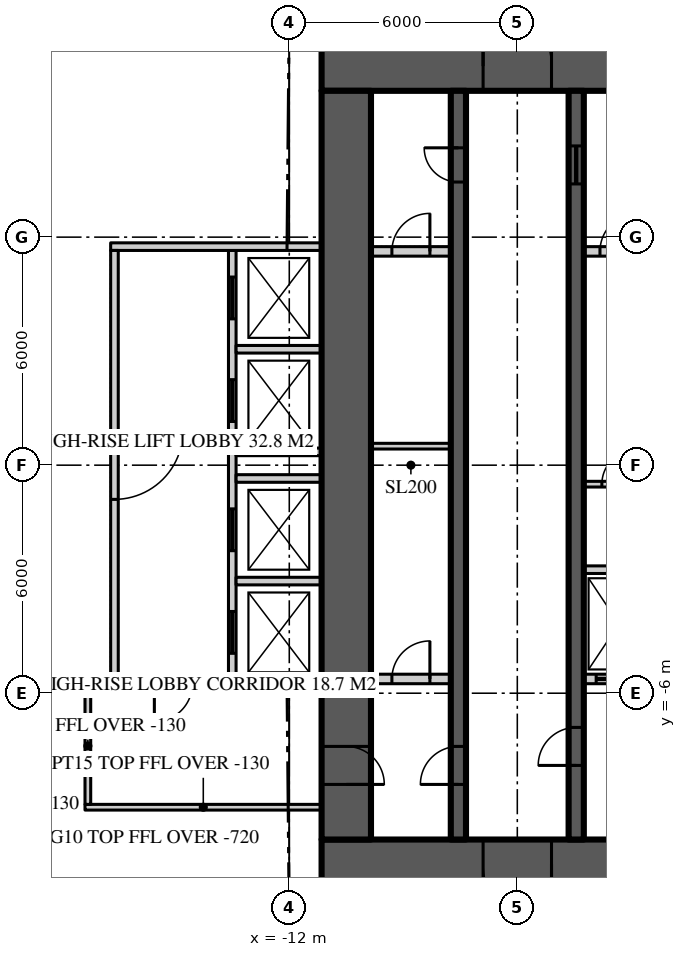
"""IFC4 building model, lengths in metres.
Left out: names, types, materials, properties, quantities, classifications, styles, units other than length and angle.
Written with IfcOpenShell. Run it as: python <this file> out.ifc"""

import sys

from ifc_helpers import new_model, si_unit, direction, frame, frame_2d, origin, place, context, subcontext, project, spatial, rectangle, extrude, element, fill, save


model = new_model("IFC4")
c1 = context("Model", 3, precision=1e-05, world=origin(), true_north=direction((0.0, 1.0)))
c2 = subcontext(c1, "Body", "Model", "MODEL_VIEW")
j1 = project(units=[si_unit("LENGTHUNIT", "METRE"), si_unit("PLANEANGLEUNIT", "RADIAN")], contexts=[c1])
p1 = place(None, origin())
s1 = spatial("IfcSite", under=j1, at=p1, CompositionType="ELEMENT")
p2 = place(p1, origin())
s2 = spatial("IfcBuilding", under=s1, at=p2, CompositionType="ELEMENT")
p3 = place(p2, frame((0.0, 0.0, 232.2)))
s3 = spatial("IfcBuildingStorey", under=s2, at=p3, CompositionType="ELEMENT", Elevation=232.2)
p4 = place(p3, frame((-11.15, 10.5, 0.0), z_axis=(0.0, 0.0, 1.0), x_axis=(1.0, 0.0, 0.0)))
e1 = element("IfcWall", 1, at=p4, inside=s3, PredefinedType="SHEAR", context=c2, shape_type="SweptSolid", body=[
    extrude(rectangle(XDim=22.3, YDim=1.3, at=frame_2d((11.15, 0.0))), origin(), (0.0, 0.0, 1.0), 3.9),
])
p5 = place(p4, frame((4.25, 0.0, 0.0)))
e2 = element("IfcOpeningElement", 2, at=p5, cuts=e1, PredefinedType="OPENING", context=c2, shape_type="SweptSolid", body=[
    extrude(rectangle(XDim=1.8, YDim=2.2, at=frame_2d((0.9, 1.1))), frame((0.0, 0.66, 0.0), z_axis=(0.0, -1.0, 0.0), x_axis=(1.0, 0.0, 0.0)), (0.0, 0.0, 1.0), 1.32),
])
p6 = place(p4, frame((16.25, 0.0, 0.0)))
e3 = element("IfcOpeningElement", 3, at=p6, cuts=e1, PredefinedType="OPENING", context=c2, shape_type="SweptSolid", body=[
    extrude(rectangle(XDim=1.8, YDim=2.2, at=frame_2d((0.9, 1.1))), frame((0.0, 0.66, 0.0), z_axis=(0.0, -1.0, 0.0), x_axis=(1.0, 0.0, 0.0)), (0.0, 0.0, 1.0), 1.32),
])
p7 = place(p3, frame((11.15, -10.5, 0.0), z_axis=(0.0, 0.0, 1.0), x_axis=(-1.0, 0.0, 0.0)))
e4 = element("IfcWall", 4, at=p7, inside=s3, PredefinedType="SHEAR", context=c2, shape_type="SweptSolid", body=[
    extrude(rectangle(XDim=22.3, YDim=1.3, at=frame_2d((11.15, 0.0))), origin(), (0.0, 0.0, 1.0), 3.9),
])
p8 = place(p7, frame((16.25, 0.0, 0.0)))
e5 = element("IfcOpeningElement", 5, at=p8, cuts=e4, PredefinedType="OPENING", context=c2, shape_type="SweptSolid", body=[
    extrude(rectangle(XDim=1.8, YDim=2.2, at=frame_2d((0.9, 1.1))), frame((0.0, 0.66, 0.0), z_axis=(0.0, -1.0, 0.0), x_axis=(1.0, 0.0, 0.0)), (0.0, 0.0, 1.0), 1.32),
])
p9 = place(p7, frame((4.25, 0.0, 0.0)))
e6 = element("IfcOpeningElement", 6, at=p9, cuts=e4, PredefinedType="OPENING", context=c2, shape_type="SweptSolid", body=[
    extrude(rectangle(XDim=1.8, YDim=2.2, at=frame_2d((0.9, 1.1))), frame((0.0, 0.66, 0.0), z_axis=(0.0, -1.0, 0.0), x_axis=(1.0, 0.0, 0.0)), (0.0, 0.0, 1.0), 1.32),
])
p10 = place(p3, frame((-10.5, 9.85, 0.0), z_axis=(0.0, 0.0, 1.0), x_axis=(0.0, -1.0, 0.0)))
e7 = element("IfcWall", 7, at=p10, inside=s3, PredefinedType="SHEAR", context=c2, shape_type="SweptSolid", body=[
    extrude(rectangle(XDim=19.7, YDim=1.3, at=frame_2d((9.85, 0.0))), origin(), (0.0, 0.0, 1.0), 3.9),
])
p11 = place(p10, frame((17.25, 0.0, 0.0)))
e8 = element("IfcOpeningElement", 8, at=p11, cuts=e7, PredefinedType="OPENING", context=c2, shape_type="SweptSolid", body=[
    extrude(rectangle(XDim=1.0, YDim=2.2, at=frame_2d((0.5, 1.1))), frame((0.0, 0.66, 0.0), z_axis=(0.0, -1.0, 0.0), x_axis=(1.0, 0.0, 0.0)), (0.0, 0.0, 1.0), 1.32),
])
p12 = place(p3, frame((-7.55, -9.85, 0.0), z_axis=(0.0, 0.0, 1.0), x_axis=(0.0, 1.0, 0.0)))
e9 = element("IfcWall", 9, at=p12, inside=s3, PredefinedType="SHEAR", context=c2, shape_type="SweptSolid", body=[
    extrude(rectangle(XDim=19.7, YDim=0.4, at=frame_2d((9.85, 0.0))), origin(), (0.0, 0.0, 1.0), 3.9),
])
p13 = place(p12, frame((1.45, 0.0, 0.0)))
e10 = element("IfcOpeningElement", 10, at=p13, cuts=e9, PredefinedType="OPENING", context=c2, shape_type="SweptSolid", body=[
    extrude(rectangle(XDim=1.0, YDim=2.2, at=frame_2d((0.5, 1.1))), frame((0.0, 0.21, 0.0), z_axis=(0.0, -1.0, 0.0), x_axis=(1.0, 0.0, 0.0)), (0.0, 0.0, 1.0), 0.42),
])
p14 = place(p12, frame((17.3, 0.0, 0.0)))
e11 = element("IfcOpeningElement", 11, at=p14, cuts=e9, PredefinedType="OPENING", context=c2, shape_type="SweptSolid", body=[
    extrude(rectangle(XDim=0.9, YDim=2.1, at=frame_2d((0.45, 1.05))), frame((0.0, 0.21, 0.0), z_axis=(0.0, -1.0, 0.0), x_axis=(1.0, 0.0, 0.0)), (0.0, 0.0, 1.0), 0.42),
])
p15 = place(p3, frame((-4.45, -9.85, 0.0), z_axis=(0.0, 0.0, 1.0), x_axis=(0.0, 1.0, 0.0)))
e12 = element("IfcWall", 12, at=p15, inside=s3, PredefinedType="SHEAR", context=c2, shape_type="SweptSolid", body=[
    extrude(rectangle(XDim=19.7, YDim=0.4, at=frame_2d((9.85, 0.0))), origin(), (0.0, 0.0, 1.0), 3.9),
])
p16 = place(p15, frame((1.95, 0.0, 0.0)))
e13 = element("IfcOpeningElement", 13, at=p16, cuts=e12, PredefinedType="OPENING", context=c2, shape_type="SweptSolid", body=[
    extrude(rectangle(XDim=1.0, YDim=2.2, at=frame_2d((0.5, 1.1))), frame((0.0, 0.21, 0.0), z_axis=(0.0, -1.0, 0.0), x_axis=(1.0, 0.0, 0.0)), (0.0, 0.0, 1.0), 0.42),
])
p17 = place(p15, frame((17.25, 0.0, 0.0)))
e14 = element("IfcOpeningElement", 14, at=p17, cuts=e12, PredefinedType="OPENING", context=c2, shape_type="SweptSolid", body=[
    extrude(rectangle(XDim=1.0, YDim=2.1, at=frame_2d((0.5, 1.05))), frame((0.0, 0.21, 0.0), z_axis=(0.0, -1.0, 0.0), x_axis=(1.0, 0.0, 0.0)), (0.0, 0.0, 1.0), 0.42),
])
p18 = place(p3, frame((-9.85, 5.625, 0.0), z_axis=(0.0, 0.0, 1.0), x_axis=(1.0, 0.0, 0.0)))
e15 = element("IfcWall", 15, at=p18, inside=s3, PredefinedType="SOLIDWALL", context=c2, shape_type="SweptSolid", body=[
    extrude(rectangle(XDim=2.1, YDim=0.25, at=frame_2d((1.05, 0.0))), origin(), (0.0, 0.0, 1.0), 3.7),
])
p19 = place(p18, frame((0.55, 0.0, 0.0)))
e16 = element("IfcOpeningElement", 16, at=p19, cuts=e15, PredefinedType="OPENING", context=c2, shape_type="SweptSolid", body=[
    extrude(rectangle(XDim=1.0, YDim=2.2, at=frame_2d((0.5, 1.1))), frame((0.0, 0.135, 0.0), z_axis=(0.0, -1.0, 0.0), x_axis=(1.0, 0.0, 0.0)), (0.0, 0.0, 1.0), 0.27),
])
p20 = place(p3, frame((-4.25, 5.625, 0.0), z_axis=(0.0, 0.0, 1.0), x_axis=(1.0, 0.0, 0.0)))
e17 = element("IfcWall", 17, at=p20, inside=s3, PredefinedType="SOLIDWALL", context=c2, shape_type="SweptSolid", body=[
    extrude(rectangle(XDim=1.85, YDim=0.25, at=frame_2d((0.925, 0.0))), origin(), (0.0, 0.0, 1.0), 3.7),
])
p21 = place(p20, frame((0.425, 0.0, 0.0)))
e18 = element("IfcOpeningElement", 18, at=p21, cuts=e17, PredefinedType="OPENING", context=c2, shape_type="SweptSolid", body=[
    extrude(rectangle(XDim=1.0, YDim=2.2, at=frame_2d((0.5, 1.1))), frame((0.0, 0.135, 0.0), z_axis=(0.0, -1.0, 0.0), x_axis=(1.0, 0.0, 0.0)), (0.0, 0.0, 1.0), 0.27),
])
p22 = place(p3, frame((-9.85, -5.625, 0.0), z_axis=(0.0, 0.0, 1.0), x_axis=(1.0, 0.0, 0.0)))
e19 = element("IfcWall", 19, at=p22, inside=s3, PredefinedType="SOLIDWALL", context=c2, shape_type="SweptSolid", body=[
    extrude(rectangle(XDim=2.1, YDim=0.25, at=frame_2d((1.05, 0.0))), origin(), (0.0, 0.0, 1.0), 3.7),
])
p23 = place(p22, frame((0.55, 0.0, 0.0)))
e20 = element("IfcOpeningElement", 20, at=p23, cuts=e19, PredefinedType="OPENING", context=c2, shape_type="SweptSolid", body=[
    extrude(rectangle(XDim=1.0, YDim=2.2, at=frame_2d((0.5, 1.1))), frame((0.0, 0.135, 0.0), z_axis=(0.0, -1.0, 0.0), x_axis=(1.0, 0.0, 0.0)), (0.0, 0.0, 1.0), 0.27),
])
p24 = place(p3, frame((-4.25, -5.625, 0.0), z_axis=(0.0, 0.0, 1.0), x_axis=(1.0, 0.0, 0.0)))
e21 = element("IfcWall", 21, at=p24, inside=s3, PredefinedType="SOLIDWALL", context=c2, shape_type="SweptSolid", body=[
    extrude(rectangle(XDim=1.85, YDim=0.25, at=frame_2d((0.925, 0.0))), origin(), (0.0, 0.0, 1.0), 3.7),
])
p25 = place(p24, frame((0.325, 0.0, 0.0)))
e22 = element("IfcOpeningElement", 22, at=p25, cuts=e21, PredefinedType="OPENING", context=c2, shape_type="SweptSolid", body=[
    extrude(rectangle(XDim=1.2, YDim=2.2, at=frame_2d((0.6, 1.1))), frame((0.0, 0.135, 0.0), z_axis=(0.0, -1.0, 0.0), x_axis=(1.0, 0.0, 0.0)), (0.0, 0.0, 1.0), 0.27),
])
p26 = place(p3, frame((-4.25, -2.75, 0.0), z_axis=(0.0, 0.0, 1.0), x_axis=(1.0, 0.0, 0.0)))
e23 = element("IfcWall", 23, at=p26, inside=s3, PredefinedType="SOLIDWALL", context=c2, shape_type="SweptSolid", body=[
    extrude(rectangle(XDim=1.85, YDim=0.2, at=frame_2d((0.925, 0.0))), origin(), (0.0, 0.0, 1.0), 3.7),
])
p27 = place(p3, frame((-13.5, 5.65, 0.0), z_axis=(0.0, 0.0, 1.0), x_axis=(0.0, -1.0, 0.0)))
e24 = element("IfcWall", 24, at=p27, inside=s3, PredefinedType="SOLIDWALL", context=c2, shape_type="SweptSolid", body=[
    extrude(rectangle(XDim=11.3, YDim=0.2, at=frame_2d((5.65, 0.0))), origin(), (0.0, 0.0, 1.0), 3.7),
])
p28 = place(p27, frame((0.7, 0.0, 0.0)))
e25 = element("IfcOpeningElement", 25, at=p28, cuts=e24, PredefinedType="OPENING", context=c2, shape_type="SweptSolid", body=[
    extrude(rectangle(XDim=1.1, YDim=2.2, at=frame_2d((0.55, 1.1))), frame((0.0, 0.11, 0.0), z_axis=(0.0, -1.0, 0.0), x_axis=(1.0, 0.0, 0.0)), (0.0, 0.0, 1.0), 0.22),
])
p29 = place(p27, frame((3.4, 0.0, 0.0)))
e26 = element("IfcOpeningElement", 26, at=p29, cuts=e24, PredefinedType="OPENING", context=c2, shape_type="SweptSolid", body=[
    extrude(rectangle(XDim=1.1, YDim=2.2, at=frame_2d((0.55, 1.1))), frame((0.0, 0.11, 0.0), z_axis=(0.0, -1.0, 0.0), x_axis=(1.0, 0.0, 0.0)), (0.0, 0.0, 1.0), 0.22),
])
p30 = place(p27, frame((6.8, 0.0, 0.0)))
e27 = element("IfcOpeningElement", 27, at=p30, cuts=e24, PredefinedType="OPENING", context=c2, shape_type="SweptSolid", body=[
    extrude(rectangle(XDim=1.1, YDim=2.2, at=frame_2d((0.55, 1.1))), frame((0.0, 0.11, 0.0), z_axis=(0.0, -1.0, 0.0), x_axis=(1.0, 0.0, 0.0)), (0.0, 0.0, 1.0), 0.22),
])
p31 = place(p27, frame((9.5, 0.0, 0.0)))
e28 = element("IfcOpeningElement", 28, at=p31, cuts=e24, PredefinedType="OPENING", context=c2, shape_type="SweptSolid", body=[
    extrude(rectangle(XDim=1.1, YDim=2.2, at=frame_2d((0.55, 1.1))), frame((0.0, 0.11, 0.0), z_axis=(0.0, -1.0, 0.0), x_axis=(1.0, 0.0, 0.0)), (0.0, 0.0, 1.0), 0.22),
])
p32 = place(p3, frame((-11.15, 5.75, 0.0), z_axis=(0.0, 0.0, 1.0), x_axis=(-1.0, 0.0, 0.0)))
e29 = element("IfcWall", 29, at=p32, inside=s3, PredefinedType="SOLIDWALL", context=c2, shape_type="SweptSolid", body=[
    extrude(rectangle(XDim=5.55, YDim=0.2, at=frame_2d((2.775, 0.0))), origin(), (0.0, 0.0, 1.0), 3.7),
])
p33 = place(p3, frame((-11.15, -5.75, 0.0), z_axis=(0.0, 0.0, 1.0), x_axis=(-1.0, 0.0, 0.0)))
e30 = element("IfcWall", 30, at=p33, inside=s3, PredefinedType="SOLIDWALL", context=c2, shape_type="SweptSolid", body=[
    extrude(rectangle(XDim=5.55, YDim=0.2, at=frame_2d((2.775, 0.0))), origin(), (0.0, 0.0, 1.0), 3.7),
])
p34 = place(p33, frame((3.4, 0.0, 0.0)))
e31 = element("IfcOpeningElement", 31, at=p34, cuts=e30, PredefinedType="OPENING", context=c2, shape_type="SweptSolid", body=[
    extrude(rectangle(XDim=1.0, YDim=2.2, at=frame_2d((0.5, 1.1))), frame((0.0, 0.11, 0.0), z_axis=(0.0, -1.0, 0.0), x_axis=(1.0, 0.0, 0.0)), (0.0, 0.0, 1.0), 0.22),
])
for number, where, z_axis, x_axis in (
    (32, (-11.15, 3.05, 0.0), (0.0, 0.0, 1.0), (-1.0, 0.0, 0.0)),
    (33, (-11.15, 0.35, 0.0), (0.0, 0.0, 1.0), (-1.0, 0.0, 0.0)),
    (34, (-11.15, -0.35, 0.0), (0.0, 0.0, 1.0), (-1.0, 0.0, 0.0)),
    (35, (-11.15, -3.05, 0.0), (0.0, 0.0, 1.0), (-1.0, 0.0, 0.0)),
):
    element("IfcWall", number, at=place(p3, frame(where, z_axis=z_axis, x_axis=x_axis)), inside=s3, PredefinedType="SOLIDWALL", context=c2, shape_type="SweptSolid", body=[
        extrude(rectangle(XDim=2.25, YDim=0.2, at=frame_2d((1.125, 0.0))), origin(), (0.0, 0.0, 1.0), 3.7),
    ])
p35 = place(p3, frame((-16.6, 5.65, 0.0), z_axis=(0.0, 0.0, 1.0), x_axis=(0.0, -1.0, 0.0)))
e36 = element("IfcWall", 36, at=p35, inside=s3, PredefinedType="SOLIDWALL", context=c2, shape_type="SweptSolid", body=[
    extrude(rectangle(XDim=11.3, YDim=0.2, at=frame_2d((5.65, 0.0))), origin(), (0.0, 0.0, 1.0), 3.18),
])
p36 = place(p35, frame((4.75, 0.0, 0.0)))
e37 = element("IfcOpeningElement", 37, at=p36, cuts=e36, PredefinedType="OPENING", context=c2, shape_type="SweptSolid", body=[
    extrude(rectangle(XDim=1.8, YDim=2.2, at=frame_2d((0.9, 1.1))), frame((0.0, 0.11, 0.0), z_axis=(0.0, -1.0, 0.0), x_axis=(1.0, 0.0, 0.0)), (0.0, 0.0, 1.0), 0.22),
])
p37 = place(p3, frame((-11.15, -9.0, 0.0), z_axis=(0.0, 0.0, 1.0), x_axis=(-1.0, 0.0, 0.0)))
e38 = element("IfcWall", 38, at=p37, inside=s3, PredefinedType="PARTITIONING", context=c2, shape_type="SweptSolid", body=[
    extrude(rectangle(XDim=6.225, YDim=0.15, at=frame_2d((3.113, 0.0))), origin(), (0.0, 0.0, 1.0), 3.77),
])
p38 = place(p3, frame((-17.3, -5.85, 0.0), z_axis=(0.0, 0.0, 1.0), x_axis=(0.0, -1.0, 0.0)))
e39 = element("IfcWall", 39, at=p38, inside=s3, PredefinedType="PARTITIONING", context=c2, shape_type="SweptSolid", body=[
    extrude(rectangle(XDim=3.075, YDim=0.15, at=frame_2d((1.538, 0.0))), origin(), (0.0, 0.0, 1.0), 3.77),
])
p39 = place(p3, frame((-9.85, 0.5, 0.0), z_axis=(0.0, 0.0, 1.0), x_axis=(1.0, 0.0, 0.0)))
e40 = element("IfcWall", 40, at=p39, inside=s3, PredefinedType="SOLIDWALL", context=c2, shape_type="SweptSolid", body=[
    extrude(rectangle(XDim=2.1, YDim=0.15, at=frame_2d((1.05, 0.0))), origin(), (0.0, 0.0, 1.0), 3.77),
])
p40 = place(p3, frame((-4.25, -0.5, 0.0), z_axis=(0.0, 0.0, 1.0), x_axis=(1.0, 0.0, 0.0)))
e41 = element("IfcWall", 41, at=p40, inside=s3, PredefinedType="SOLIDWALL", context=c2, shape_type="SweptSolid", body=[
    extrude(rectangle(XDim=1.85, YDim=0.15, at=frame_2d((0.925, 0.0))), origin(), (0.0, 0.0, 1.0), 3.77),
])
p41 = place(p40, frame((0.475, 0.0, 0.0)))
e42 = element("IfcOpeningElement", 42, at=p41, cuts=e41, PredefinedType="OPENING", context=c2, shape_type="SweptSolid", body=[
    extrude(rectangle(XDim=0.9, YDim=2.1, at=frame_2d((0.45, 1.05))), frame((0.0, 0.085, 0.0), z_axis=(0.0, -1.0, 0.0), x_axis=(1.0, 0.0, 0.0)), (0.0, 0.0, 1.0), 0.17),
])
p42 = place(p5, origin())
e43 = element("IfcDoor", 43, at=p42, inside=s3, OperationType="DOUBLE_DOOR_DOUBLE_SWING", PredefinedType="DOOR", context=c2, shape_type="SweptSolid", body=[
    extrude(rectangle(XDim=1.8, YDim=2.2, at=frame_2d((0.9, 1.1))), frame((0.0, 0.025, 0.0), z_axis=(0.0, -1.0, 0.0), x_axis=(1.0, 0.0, 0.0)), (0.0, 0.0, 1.0), 0.05),
])
fill(e2, e43)
p43 = place(p8, origin())
e44 = element("IfcDoor", 44, at=p43, inside=s3, OperationType="DOUBLE_DOOR_DOUBLE_SWING", PredefinedType="DOOR", context=c2, shape_type="SweptSolid", body=[
    extrude(rectangle(XDim=1.8, YDim=2.2, at=frame_2d((0.9, 1.1))), frame((0.0, 0.025, 0.0), z_axis=(0.0, -1.0, 0.0), x_axis=(1.0, 0.0, 0.0)), (0.0, 0.0, 1.0), 0.05),
])
fill(e5, e44)
p44 = place(p13, origin())
e45 = element("IfcDoor", 45, at=p44, inside=s3, OperationType="SINGLE_SWING_LEFT", PredefinedType="DOOR", context=c2, shape_type="SweptSolid", body=[
    extrude(rectangle(XDim=1.0, YDim=2.2, at=frame_2d((0.5, 1.1))), frame((0.0, 0.025, 0.0), z_axis=(0.0, -1.0, 0.0), x_axis=(1.0, 0.0, 0.0)), (0.0, 0.0, 1.0), 0.05),
])
fill(e10, e45)
p45 = place(p11, origin())
e46 = element("IfcDoor", 46, at=p45, inside=s3, OperationType="SINGLE_SWING_RIGHT", PredefinedType="DOOR", context=c2, shape_type="SweptSolid", body=[
    extrude(rectangle(XDim=1.0, YDim=2.2, at=frame_2d((0.5, 1.1))), frame((0.0, 0.025, 0.0), z_axis=(0.0, -1.0, 0.0), x_axis=(1.0, 0.0, 0.0)), (0.0, 0.0, 1.0), 0.05),
])
fill(e8, e46)
p46 = place(p16, origin())
e47 = element("IfcDoor", 47, at=p46, inside=s3, OperationType="SINGLE_SWING_LEFT", PredefinedType="DOOR", context=c2, shape_type="SweptSolid", body=[
    extrude(rectangle(XDim=1.0, YDim=2.2, at=frame_2d((0.5, 1.1))), frame((0.0, 0.025, 0.0), z_axis=(0.0, -1.0, 0.0), x_axis=(1.0, 0.0, 0.0)), (0.0, 0.0, 1.0), 0.05),
])
fill(e13, e47)
p47 = place(p14, origin())
e48 = element("IfcDoor", 48, at=p47, inside=s3, OperationType="SINGLE_SWING_RIGHT", PredefinedType="DOOR", context=c2, shape_type="SweptSolid", body=[
    extrude(rectangle(XDim=0.9, YDim=2.1, at=frame_2d((0.45, 1.05))), frame((0.0, 0.025, 0.0), z_axis=(0.0, -1.0, 0.0), x_axis=(1.0, 0.0, 0.0)), (0.0, 0.0, 1.0), 0.05),
])
fill(e11, e48)
p48 = place(p17, origin())
e49 = element("IfcDoor", 49, at=p48, inside=s3, OperationType="SLIDING_TO_LEFT", PredefinedType="DOOR", context=c2, shape_type="SweptSolid", body=[
    extrude(rectangle(XDim=1.0, YDim=2.1, at=frame_2d((0.5, 1.05))), frame((0.0, 0.025, 0.0), z_axis=(0.0, -1.0, 0.0), x_axis=(1.0, 0.0, 0.0)), (0.0, 0.0, 1.0), 0.05),
])
fill(e14, e49)
p49 = place(p25, origin())
e50 = element("IfcDoor", 50, at=p49, inside=s3, OperationType="SLIDING_TO_LEFT", PredefinedType="DOOR", context=c2, shape_type="SweptSolid", body=[
    extrude(rectangle(XDim=1.2, YDim=2.2, at=frame_2d((0.6, 1.1))), frame((0.0, 0.025, 0.0), z_axis=(0.0, -1.0, 0.0), x_axis=(1.0, 0.0, 0.0)), (0.0, 0.0, 1.0), 0.05),
])
fill(e22, e50)
p50 = place(p36, origin())
e51 = element("IfcDoor", 51, at=p50, inside=s3, OperationType="DOUBLE_DOOR_DOUBLE_SWING", PredefinedType="DOOR", context=c2, shape_type="SweptSolid", body=[
    extrude(rectangle(XDim=1.8, YDim=2.2, at=frame_2d((0.9, 1.1))), frame((0.0, 0.025, 0.0), z_axis=(0.0, -1.0, 0.0), x_axis=(1.0, 0.0, 0.0)), (0.0, 0.0, 1.0), 0.05),
])
fill(e37, e51)
p51 = place(p28, origin())
e52 = element("IfcDoor", 52, at=p51, inside=s3, OperationType="SLIDING_TO_LEFT", PredefinedType="DOOR", context=c2, shape_type="SweptSolid", body=[
    extrude(rectangle(XDim=1.1, YDim=2.2, at=frame_2d((0.55, 1.1))), frame((0.0, 0.025, 0.0), z_axis=(0.0, -1.0, 0.0), x_axis=(1.0, 0.0, 0.0)), (0.0, 0.0, 1.0), 0.05),
])
fill(e25, e52)
p52 = place(p29, origin())
e53 = element("IfcDoor", 53, at=p52, inside=s3, OperationType="SLIDING_TO_LEFT", PredefinedType="DOOR", context=c2, shape_type="SweptSolid", body=[
    extrude(rectangle(XDim=1.1, YDim=2.2, at=frame_2d((0.55, 1.1))), frame((0.0, 0.025, 0.0), z_axis=(0.0, -1.0, 0.0), x_axis=(1.0, 0.0, 0.0)), (0.0, 0.0, 1.0), 0.05),
])
fill(e26, e53)
p53 = place(p30, origin())
e54 = element("IfcDoor", 54, at=p53, inside=s3, OperationType="SLIDING_TO_LEFT", PredefinedType="DOOR", context=c2, shape_type="SweptSolid", body=[
    extrude(rectangle(XDim=1.1, YDim=2.2, at=frame_2d((0.55, 1.1))), frame((0.0, 0.025, 0.0), z_axis=(0.0, -1.0, 0.0), x_axis=(1.0, 0.0, 0.0)), (0.0, 0.0, 1.0), 0.05),
])
fill(e27, e54)
p54 = place(p31, origin())
e55 = element("IfcDoor", 55, at=p54, inside=s3, OperationType="SLIDING_TO_LEFT", PredefinedType="DOOR", context=c2, shape_type="SweptSolid", body=[
    extrude(rectangle(XDim=1.1, YDim=2.2, at=frame_2d((0.55, 1.1))), frame((0.0, 0.025, 0.0), z_axis=(0.0, -1.0, 0.0), x_axis=(1.0, 0.0, 0.0)), (0.0, 0.0, 1.0), 0.05),
])
fill(e28, e55)
p55 = place(p34, origin())
e56 = element("IfcDoor", 56, at=p55, inside=s3, OperationType="SINGLE_SWING_RIGHT", PredefinedType="DOOR", context=c2, shape_type="SweptSolid", body=[
    extrude(rectangle(XDim=1.0, YDim=2.2, at=frame_2d((0.5, 1.1))), frame((0.0, 0.025, 0.0), z_axis=(0.0, -1.0, 0.0), x_axis=(1.0, 0.0, 0.0)), (0.0, 0.0, 1.0), 0.05),
])
fill(e31, e56)
p56 = place(p19, origin())
e57 = element("IfcDoor", 57, at=p56, inside=s3, OperationType="SINGLE_SWING_RIGHT", PredefinedType="DOOR", context=c2, shape_type="SweptSolid", body=[
    extrude(rectangle(XDim=1.0, YDim=2.2, at=frame_2d((0.5, 1.1))), frame((0.0, 0.025, 0.0), z_axis=(0.0, -1.0, 0.0), x_axis=(1.0, 0.0, 0.0)), (0.0, 0.0, 1.0), 0.05),
])
fill(e16, e57)
p57 = place(p23, origin())
e58 = element("IfcDoor", 58, at=p57, inside=s3, OperationType="SINGLE_SWING_RIGHT", PredefinedType="DOOR", context=c2, shape_type="SweptSolid", body=[
    extrude(rectangle(XDim=1.0, YDim=2.2, at=frame_2d((0.5, 1.1))), frame((0.0, 0.025, 0.0), z_axis=(0.0, -1.0, 0.0), x_axis=(1.0, 0.0, 0.0)), (0.0, 0.0, 1.0), 0.05),
])
fill(e20, e58)
p58 = place(p41, origin())
e59 = element("IfcDoor", 59, at=p58, inside=s3, OperationType="SINGLE_SWING_RIGHT", PredefinedType="DOOR", context=c2, shape_type="SweptSolid", body=[
    extrude(rectangle(XDim=0.9, YDim=2.1, at=frame_2d((0.45, 1.05))), frame((0.0, 0.025, 0.0), z_axis=(0.0, -1.0, 0.0), x_axis=(1.0, 0.0, 0.0)), (0.0, 0.0, 1.0), 0.05),
])
fill(e42, e59)
p59 = place(p21, origin())
e60 = element("IfcDoor", 60, at=p59, inside=s3, OperationType="SINGLE_SWING_RIGHT", PredefinedType="DOOR", context=c2, shape_type="SweptSolid", body=[
    extrude(rectangle(XDim=1.0, YDim=2.2, at=frame_2d((0.5, 1.1))), frame((0.0, 0.025, 0.0), z_axis=(0.0, -1.0, 0.0), x_axis=(1.0, 0.0, 0.0)), (0.0, 0.0, 1.0), 0.05),
])
fill(e18, e60)
save(model, sys.argv[1])
